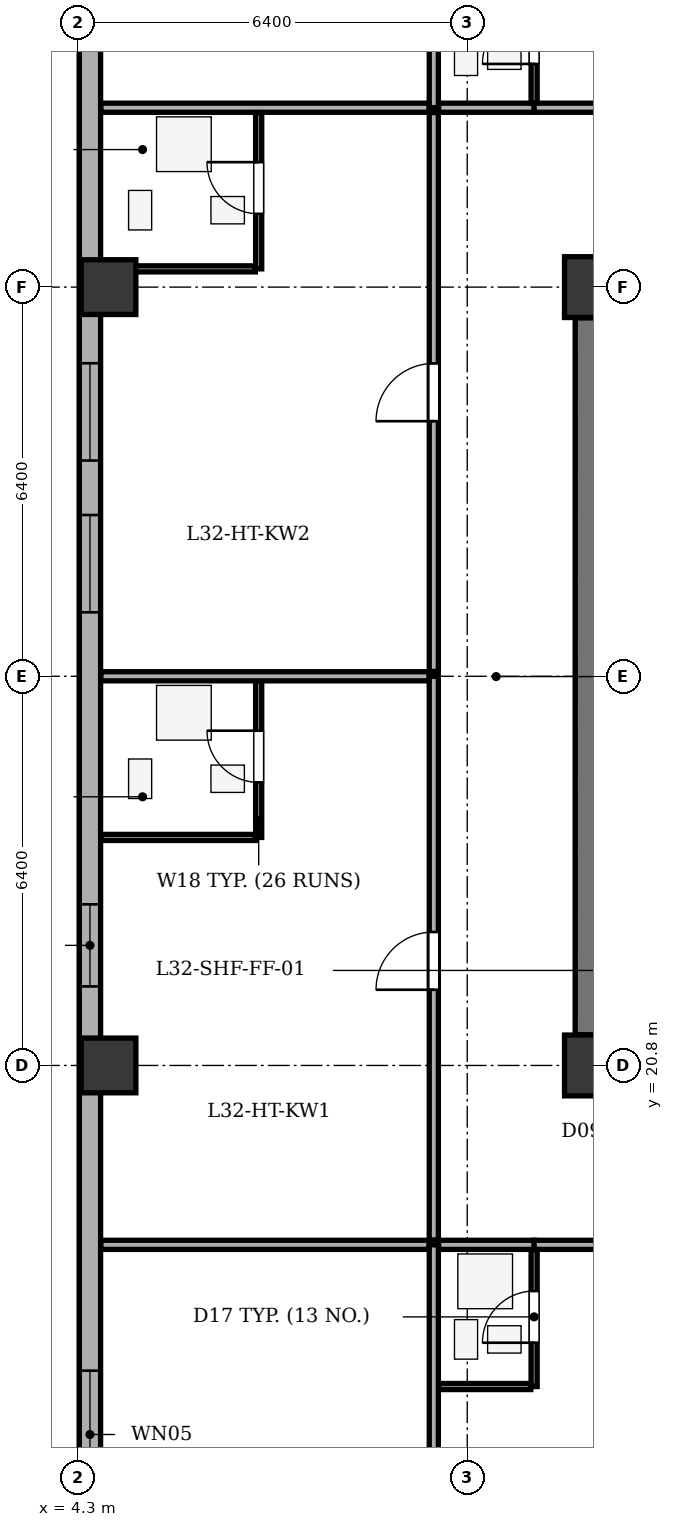
"""IFC4 building model, lengths in metres.
Left out: names, types, materials, properties, quantities, classifications, styles, units other than length and angle.
Written with IfcOpenShell. Run it as: python <this file> out.ifc"""

import sys

from ifc_helpers import new_model, si_unit, direction, frame, frame_2d, origin, origin_2d, place, context, subcontext, project, spatial, rectangle, extrude, element, fill, save


model = new_model("IFC4")
c1 = context("Model", 3, precision=1e-05, world=origin(), true_north=direction((0.0, 1.0)))
c2 = subcontext(c1, "Body", "Model", "MODEL_VIEW")
j1 = project(units=[si_unit("LENGTHUNIT", "METRE"), si_unit("PLANEANGLEUNIT", "RADIAN")], contexts=[c1])
p1 = place(None, origin())
s1 = spatial("IfcSite", under=j1, at=p1, CompositionType="ELEMENT")
p2 = place(p1, origin())
s2 = spatial("IfcBuilding", under=s1, at=p2, CompositionType="ELEMENT")
p3 = place(p2, frame((0.0, 0.0, 130.8)))
s3 = spatial("IfcBuildingStorey", under=s2, at=p3, CompositionType="ELEMENT", Elevation=130.8)
for number, where, z_axis, x_axis in (
    (1, (12.8, 20.8, 0.0), (0.0, 0.0, 1.0), (1.0, 0.0, 0.0)),
    (2, (12.8, 33.6, 0.0), (0.0, 0.0, 1.0), (1.0, 0.0, 0.0)),
):
    element("IfcColumn", number, at=place(p3, frame(where, z_axis=z_axis, x_axis=x_axis)), inside=s3, PredefinedType="COLUMN", context=c2, shape_type="SweptSolid", body=[
        extrude(rectangle(XDim=1.0, YDim=1.0, at=origin_2d()), origin(), (0.0, 0.0, 1.0), 3.5),
    ])
for number, where, z_axis, x_axis in (
    (3, (4.8, 20.8, 0.0), (0.0, 0.0, 1.0), (1.0, 0.0, 0.0)),
    (4, (4.8, 33.6, 0.0), (0.0, 0.0, 1.0), (1.0, 0.0, 0.0)),
):
    element("IfcColumn", number, at=place(p3, frame(where, z_axis=z_axis, x_axis=x_axis)), inside=s3, PredefinedType="COLUMN", context=c2, shape_type="SweptSolid", body=[
        extrude(rectangle(XDim=0.9, YDim=0.9, at=origin_2d()), origin(), (0.0, 0.0, 1.0), 3.5),
    ])
p4 = place(p3, frame((4.495, 6.5, 0.0), z_axis=(0.0, 0.0, 1.0), x_axis=(0.0, 1.0, 0.0)))
e5 = element("IfcWall", 5, at=p4, inside=s3, PredefinedType="STANDARD", context=c2, shape_type="SweptSolid", body=[
    extrude(rectangle(XDim=35.0, YDim=0.35, at=frame_2d((17.5, 0.0))), origin(), (0.0, 0.0, 1.0), 2.785),
])
p5 = place(p4, frame((2.595, 0.0, 0.75)))
e6 = element("IfcOpeningElement", 6, at=p5, cuts=e5, PredefinedType="OPENING", context=c2, shape_type="SweptSolid", body=[
    extrude(rectangle(XDim=1.6, YDim=1.75, at=frame_2d((0.8, 0.875))), frame((0.0, 0.185, 0.0), z_axis=(0.0, -1.0, 0.0), x_axis=(1.0, 0.0, 0.0)), (0.0, 0.0, 1.0), 0.37),
])
p6 = place(p4, frame((7.181, 0.0, 0.75)))
e7 = element("IfcOpeningElement", 7, at=p6, cuts=e5, PredefinedType="OPENING", context=c2, shape_type="SweptSolid", body=[
    extrude(rectangle(XDim=2.1, YDim=1.75, at=frame_2d((1.05, 0.875))), frame((0.0, 0.185, 0.0), z_axis=(0.0, -1.0, 0.0), x_axis=(1.0, 0.0, 0.0)), (0.0, 0.0, 1.0), 0.37),
])
p7 = place(p4, frame((15.6, 0.0, 0.75)))
e8 = element("IfcOpeningElement", 8, at=p7, cuts=e5, PredefinedType="OPENING", context=c2, shape_type="SweptSolid", body=[
    extrude(rectangle(XDim=1.35, YDim=1.75, at=frame_2d((0.675, 0.875))), frame((0.0, 0.185, 0.0), z_axis=(0.0, -1.0, 0.0), x_axis=(1.0, 0.0, 0.0)), (0.0, 0.0, 1.0), 0.37),
])
p8 = place(p4, frame((21.752, 0.0, 0.75)))
e9 = element("IfcOpeningElement", 9, at=p8, cuts=e5, PredefinedType="OPENING", context=c2, shape_type="SweptSolid", body=[
    extrude(rectangle(XDim=1.6, YDim=1.75, at=frame_2d((0.8, 0.875))), frame((0.0, 0.185, 0.0), z_axis=(0.0, -1.0, 0.0), x_axis=(1.0, 0.0, 0.0)), (0.0, 0.0, 1.0), 0.37),
])
p9 = place(p4, frame((24.248, 0.0, 0.75)))
e10 = element("IfcOpeningElement", 10, at=p9, cuts=e5, PredefinedType="OPENING", context=c2, shape_type="SweptSolid", body=[
    extrude(rectangle(XDim=1.6, YDim=1.75, at=frame_2d((0.8, 0.875))), frame((0.0, 0.185, 0.0), z_axis=(0.0, -1.0, 0.0), x_axis=(1.0, 0.0, 0.0)), (0.0, 0.0, 1.0), 0.37),
])
p10 = place(p4, frame((31.588, 0.0, 0.75)))
e11 = element("IfcOpeningElement", 11, at=p10, cuts=e5, PredefinedType="OPENING", context=c2, shape_type="SweptSolid", body=[
    extrude(rectangle(XDim=1.6, YDim=1.75, at=frame_2d((0.8, 0.875))), frame((0.0, 0.185, 0.0), z_axis=(0.0, -1.0, 0.0), x_axis=(1.0, 0.0, 0.0)), (0.0, 0.0, 1.0), 0.37),
])
p11 = place(p3, frame((12.8, 21.305, 0.0), z_axis=(0.0, 0.0, 1.0), x_axis=(0.0, 1.0, 0.0)))
e12 = element("IfcWall", 12, at=p11, inside=s3, PredefinedType="SHEAR", context=c2, shape_type="SweptSolid", body=[
    extrude(rectangle(XDim=11.79, YDim=0.65, at=frame_2d((5.895, 0.0))), origin(), (0.0, 0.0, 1.0), 3.2),
])
p12 = place(p3, frame((10.15, 1.875, 0.0), z_axis=(0.0, 0.0, 1.0), x_axis=(0.0, 1.0, 0.0)))
e13 = element("IfcWall", 13, at=p12, inside=s3, PredefinedType="PARTITIONING", context=c2, shape_type="SweptSolid", body=[
    extrude(rectangle(XDim=15.975, YDim=0.15, at=frame_2d((7.988, 0.0))), origin(), (0.0, 0.0, 1.0), 3.2),
])
p13 = place(p3, frame((10.23, 17.85, 0.0), z_axis=(0.0, 0.0, 1.0), x_axis=(1.0, 0.0, 0.0)))
e14 = element("IfcWall", 14, at=p13, inside=s3, PredefinedType="PARTITIONING", context=c2, shape_type="SweptSolid", body=[
    extrude(rectangle(XDim=1.57, YDim=0.15, at=frame_2d((0.785, 0.0))), origin(), (0.0, 0.0, 1.0), 3.2),
])
p14 = place(p3, frame((11.8, 17.85, 0.0), z_axis=(0.0, 0.0, 1.0), x_axis=(1.0, 0.0, 0.0)))
e15 = element("IfcWall", 15, at=p14, inside=s3, PredefinedType="PARTITIONING", context=c2, shape_type="SweptSolid", body=[
    extrude(rectangle(XDim=3.814, YDim=0.15, at=frame_2d((1.907, 0.0))), origin(), (0.0, 0.0, 1.0), 3.2),
])
p15 = place(p14, frame((1.427, 0.0, 0.0)))
e16 = element("IfcOpeningElement", 16, at=p15, cuts=e15, PredefinedType="OPENING", context=c2, shape_type="SweptSolid", body=[
    extrude(rectangle(XDim=0.95, YDim=2.1, at=frame_2d((0.475, 1.05))), frame((0.0, 0.085, 0.0), z_axis=(0.0, -1.0, 0.0), x_axis=(1.0, 0.0, 0.0)), (0.0, 0.0, 1.0), 0.17),
])
p16 = place(p3, frame((11.8, 15.52, 0.0), z_axis=(0.0, 0.0, 1.0), x_axis=(0.0, 1.0, 0.0)))
e17 = element("IfcWall", 17, at=p16, inside=s3, PredefinedType="PARTITIONING", context=c2, shape_type="SweptSolid", body=[
    extrude(rectangle(XDim=2.25, YDim=0.1, at=frame_2d((1.125, 0.0))), origin(), (0.0, 0.0, 1.0), 3.2),
])
p17 = place(p16, frame((0.72, 0.0, 0.0)))
e18 = element("IfcOpeningElement", 18, at=p17, cuts=e17, PredefinedType="OPENING", context=c2, shape_type="SweptSolid", body=[
    extrude(rectangle(XDim=0.85, YDim=2.05, at=frame_2d((0.425, 1.025))), frame((0.0, 0.06, 0.0), z_axis=(0.0, -1.0, 0.0), x_axis=(1.0, 0.0, 0.0)), (0.0, 0.0, 1.0), 0.12),
])
p18 = place(p3, frame((10.23, 15.52, 0.0), z_axis=(0.0, 0.0, 1.0), x_axis=(1.0, 0.0, 0.0)))
e19 = element("IfcWall", 19, at=p18, inside=s3, PredefinedType="PARTITIONING", context=c2, shape_type="SweptSolid", body=[
    extrude(rectangle(XDim=1.515, YDim=0.1, at=frame_2d((0.758, 0.0))), origin(), (0.0, 0.0, 1.0), 3.2),
])
p19 = place(p3, frame((10.15, 36.55, 0.0), z_axis=(0.0, 0.0, 1.0), x_axis=(0.0, 1.0, 0.0)))
e20 = element("IfcWall", 20, at=p19, inside=s3, PredefinedType="PARTITIONING", context=c2, shape_type="SweptSolid", body=[
    extrude(rectangle(XDim=9.575, YDim=0.15, at=frame_2d((4.788, 0.0))), origin(), (0.0, 0.0, 1.0), 3.2),
])
p20 = place(p3, frame((10.23, 36.55, 0.0), z_axis=(0.0, 0.0, 1.0), x_axis=(1.0, 0.0, 0.0)))
e21 = element("IfcWall", 21, at=p20, inside=s3, PredefinedType="PARTITIONING", context=c2, shape_type="SweptSolid", body=[
    extrude(rectangle(XDim=1.57, YDim=0.15, at=frame_2d((0.785, 0.0))), origin(), (0.0, 0.0, 1.0), 3.2),
])
p21 = place(p3, frame((11.8, 36.55, 0.0), z_axis=(0.0, 0.0, 1.0), x_axis=(1.0, 0.0, 0.0)))
e22 = element("IfcWall", 22, at=p21, inside=s3, PredefinedType="PARTITIONING", context=c2, shape_type="SweptSolid", body=[
    extrude(rectangle(XDim=4.156, YDim=0.15, at=frame_2d((2.078, 0.0))), origin(), (0.0, 0.0, 1.0), 3.2),
])
p22 = place(p21, frame((1.598, 0.0, 0.0)))
e23 = element("IfcOpeningElement", 23, at=p22, cuts=e22, PredefinedType="OPENING", context=c2, shape_type="SweptSolid", body=[
    extrude(rectangle(XDim=0.95, YDim=2.1, at=frame_2d((0.475, 1.05))), frame((0.0, 0.085, 0.0), z_axis=(0.0, -1.0, 0.0), x_axis=(1.0, 0.0, 0.0)), (0.0, 0.0, 1.0), 0.17),
])
p23 = place(p3, frame((11.8, 36.63, 0.0), z_axis=(0.0, 0.0, 1.0), x_axis=(0.0, 1.0, 0.0)))
e24 = element("IfcWall", 24, at=p23, inside=s3, PredefinedType="PARTITIONING", context=c2, shape_type="SweptSolid", body=[
    extrude(rectangle(XDim=2.25, YDim=0.1, at=frame_2d((1.125, 0.0))), origin(), (0.0, 0.0, 1.0), 3.2),
])
p24 = place(p23, frame((0.64, 0.0, 0.0)))
e25 = element("IfcOpeningElement", 25, at=p24, cuts=e24, PredefinedType="OPENING", context=c2, shape_type="SweptSolid", body=[
    extrude(rectangle(XDim=0.85, YDim=2.05, at=frame_2d((0.425, 1.025))), frame((0.0, 0.06, 0.0), z_axis=(0.0, -1.0, 0.0), x_axis=(1.0, 0.0, 0.0)), (0.0, 0.0, 1.0), 0.12),
])
for number, where, z_axis, x_axis in (
    (26, (4.675, 17.85, 0.0), (0.0, 0.0, 1.0), (1.0, 0.0, 0.0)),
    (27, (4.675, 36.55, 0.0), (0.0, 0.0, 1.0), (1.0, 0.0, 0.0)),
):
    element("IfcWall", number, at=place(p3, frame(where, z_axis=z_axis, x_axis=x_axis)), inside=s3, PredefinedType="PARTITIONING", context=c2, shape_type="SweptSolid", body=[
        extrude(rectangle(XDim=5.395, YDim=0.15, at=frame_2d((2.698, 0.0))), origin(), (0.0, 0.0, 1.0), 3.2),
    ])
p25 = place(p3, frame((10.15, 17.93, 0.0), z_axis=(0.0, 0.0, 1.0), x_axis=(0.0, 1.0, 0.0)))
e28 = element("IfcWall", 28, at=p25, inside=s3, PredefinedType="PARTITIONING", context=c2, shape_type="SweptSolid", body=[
    extrude(rectangle(XDim=9.27, YDim=0.15, at=frame_2d((4.635, 0.0))), origin(), (0.0, 0.0, 1.0), 3.2),
])
p26 = place(p25, frame((4.115, 0.0, 0.0)))
e29 = element("IfcOpeningElement", 29, at=p26, cuts=e28, PredefinedType="OPENING", context=c2, shape_type="SweptSolid", body=[
    extrude(rectangle(XDim=0.95, YDim=2.1, at=frame_2d((0.475, 1.05))), frame((0.0, 0.085, 0.0), z_axis=(0.0, -1.0, 0.0), x_axis=(1.0, 0.0, 0.0)), (0.0, 0.0, 1.0), 0.17),
])
p27 = place(p3, frame((7.27, 24.55, 0.0), z_axis=(0.0, 0.0, 1.0), x_axis=(0.0, 1.0, 0.0)))
e30 = element("IfcWall", 30, at=p27, inside=s3, PredefinedType="PARTITIONING", context=c2, shape_type="SweptSolid", body=[
    extrude(rectangle(XDim=2.65, YDim=0.1, at=frame_2d((1.325, 0.0))), origin(), (0.0, 0.0, 1.0), 3.2),
])
p28 = place(p27, frame((0.905, 0.0, 0.0)))
e31 = element("IfcOpeningElement", 31, at=p28, cuts=e30, PredefinedType="OPENING", context=c2, shape_type="SweptSolid", body=[
    extrude(rectangle(XDim=0.85, YDim=2.05, at=frame_2d((0.425, 1.025))), frame((0.0, 0.06, 0.0), z_axis=(0.0, -1.0, 0.0), x_axis=(1.0, 0.0, 0.0)), (0.0, 0.0, 1.0), 0.12),
])
p29 = place(p3, frame((4.675, 24.55, 0.0), z_axis=(0.0, 0.0, 1.0), x_axis=(1.0, 0.0, 0.0)))
e32 = element("IfcWall", 32, at=p29, inside=s3, PredefinedType="PARTITIONING", context=c2, shape_type="SweptSolid", body=[
    extrude(rectangle(XDim=2.54, YDim=0.1, at=frame_2d((1.27, 0.0))), origin(), (0.0, 0.0, 1.0), 3.2),
])
p30 = place(p3, frame((4.675, 27.2, 0.0), z_axis=(0.0, 0.0, 1.0), x_axis=(1.0, 0.0, 0.0)))
e33 = element("IfcWall", 33, at=p30, inside=s3, PredefinedType="PARTITIONING", context=c2, shape_type="SweptSolid", body=[
    extrude(rectangle(XDim=5.395, YDim=0.15, at=frame_2d((2.698, 0.0))), origin(), (0.0, 0.0, 1.0), 3.2),
])
p31 = place(p3, frame((10.15, 27.28, 0.0), z_axis=(0.0, 0.0, 1.0), x_axis=(0.0, 1.0, 0.0)))
e34 = element("IfcWall", 34, at=p31, inside=s3, PredefinedType="PARTITIONING", context=c2, shape_type="SweptSolid", body=[
    extrude(rectangle(XDim=9.19, YDim=0.15, at=frame_2d((4.595, 0.0))), origin(), (0.0, 0.0, 1.0), 3.2),
])
p32 = place(p31, frame((4.115, 0.0, 0.0)))
e35 = element("IfcOpeningElement", 35, at=p32, cuts=e34, PredefinedType="OPENING", context=c2, shape_type="SweptSolid", body=[
    extrude(rectangle(XDim=0.95, YDim=2.1, at=frame_2d((0.475, 1.05))), frame((0.0, 0.085, 0.0), z_axis=(0.0, -1.0, 0.0), x_axis=(1.0, 0.0, 0.0)), (0.0, 0.0, 1.0), 0.17),
])
p33 = place(p3, frame((7.27, 33.9, 0.0), z_axis=(0.0, 0.0, 1.0), x_axis=(0.0, 1.0, 0.0)))
e36 = element("IfcWall", 36, at=p33, inside=s3, PredefinedType="PARTITIONING", context=c2, shape_type="SweptSolid", body=[
    extrude(rectangle(XDim=2.57, YDim=0.1, at=frame_2d((1.285, 0.0))), origin(), (0.0, 0.0, 1.0), 3.2),
])
p34 = place(p33, frame((0.905, 0.0, 0.0)))
e37 = element("IfcOpeningElement", 37, at=p34, cuts=e36, PredefinedType="OPENING", context=c2, shape_type="SweptSolid", body=[
    extrude(rectangle(XDim=0.85, YDim=2.05, at=frame_2d((0.425, 1.025))), frame((0.0, 0.06, 0.0), z_axis=(0.0, -1.0, 0.0), x_axis=(1.0, 0.0, 0.0)), (0.0, 0.0, 1.0), 0.12),
])
p35 = place(p3, frame((4.675, 33.9, 0.0), z_axis=(0.0, 0.0, 1.0), x_axis=(1.0, 0.0, 0.0)))
e38 = element("IfcWall", 38, at=p35, inside=s3, PredefinedType="PARTITIONING", context=c2, shape_type="SweptSolid", body=[
    extrude(rectangle(XDim=2.54, YDim=0.1, at=frame_2d((1.27, 0.0))), origin(), (0.0, 0.0, 1.0), 2.535),
])
p36 = place(p6, origin())
e39 = element("IfcWindow", 39, at=p36, inside=s3, PartitioningType="SINGLE_PANEL", PredefinedType="WINDOW", context=c2, shape_type="SweptSolid", body=[
    extrude(rectangle(XDim=2.1, YDim=1.75, at=frame_2d((1.05, 0.875))), frame((0.0, -0.01, 0.0), z_axis=(0.0, -1.0, 0.0), x_axis=(1.0, 0.0, 0.0)), (0.0, 0.0, 1.0), 0.06),
])
fill(e7, e39)
p37 = place(p7, origin())
e40 = element("IfcWindow", 40, at=p37, inside=s3, PartitioningType="SINGLE_PANEL", PredefinedType="WINDOW", context=c2, shape_type="SweptSolid", body=[
    extrude(rectangle(XDim=1.35, YDim=1.75, at=frame_2d((0.675, 0.875))), frame((0.0, -0.01, 0.0), z_axis=(0.0, -1.0, 0.0), x_axis=(1.0, 0.0, 0.0)), (0.0, 0.0, 1.0), 0.06),
])
fill(e8, e40)
p38 = place(p8, origin())
e41 = element("IfcWindow", 41, at=p38, inside=s3, PartitioningType="SINGLE_PANEL", PredefinedType="WINDOW", context=c2, shape_type="SweptSolid", body=[
    extrude(rectangle(XDim=1.6, YDim=1.75, at=frame_2d((0.8, 0.875))), frame((0.0, -0.01, 0.0), z_axis=(0.0, -1.0, 0.0), x_axis=(1.0, 0.0, 0.0)), (0.0, 0.0, 1.0), 0.06),
])
fill(e9, e41)
p39 = place(p9, origin())
e42 = element("IfcWindow", 42, at=p39, inside=s3, PartitioningType="SINGLE_PANEL", PredefinedType="WINDOW", context=c2, shape_type="SweptSolid", body=[
    extrude(rectangle(XDim=1.6, YDim=1.75, at=frame_2d((0.8, 0.875))), frame((0.0, -0.01, 0.0), z_axis=(0.0, -1.0, 0.0), x_axis=(1.0, 0.0, 0.0)), (0.0, 0.0, 1.0), 0.06),
])
fill(e10, e42)
p40 = place(p17, origin())
e43 = element("IfcDoor", 43, at=p40, inside=s3, OperationType="SINGLE_SWING_LEFT", PredefinedType="DOOR", context=c2, shape_type="SweptSolid", body=[
    extrude(rectangle(XDim=0.85, YDim=2.05, at=frame_2d((0.425, 1.025))), frame((0.0, 0.025, 0.0), z_axis=(0.0, -1.0, 0.0), x_axis=(1.0, 0.0, 0.0)), (0.0, 0.0, 1.0), 0.05),
])
fill(e18, e43)
p41 = place(p24, origin())
e44 = element("IfcDoor", 44, at=p41, inside=s3, OperationType="SINGLE_SWING_LEFT", PredefinedType="DOOR", context=c2, shape_type="SweptSolid", body=[
    extrude(rectangle(XDim=0.85, YDim=2.05, at=frame_2d((0.425, 1.025))), frame((0.0, 0.025, 0.0), z_axis=(0.0, -1.0, 0.0), x_axis=(1.0, 0.0, 0.0)), (0.0, 0.0, 1.0), 0.05),
])
fill(e25, e44)
p42 = place(p28, origin())
e45 = element("IfcDoor", 45, at=p42, inside=s3, OperationType="SINGLE_SWING_RIGHT", PredefinedType="DOOR", context=c2, shape_type="SweptSolid", body=[
    extrude(rectangle(XDim=0.85, YDim=2.05, at=frame_2d((0.425, 1.025))), frame((0.0, 0.025, 0.0), z_axis=(0.0, -1.0, 0.0), x_axis=(1.0, 0.0, 0.0)), (0.0, 0.0, 1.0), 0.05),
])
fill(e31, e45)
p43 = place(p26, origin())
e46 = element("IfcDoor", 46, at=p43, inside=s3, OperationType="SINGLE_SWING_LEFT", PredefinedType="DOOR", context=c2, shape_type="SweptSolid", body=[
    extrude(rectangle(XDim=0.95, YDim=2.1, at=frame_2d((0.475, 1.05))), frame((0.0, 0.025, 0.0), z_axis=(0.0, -1.0, 0.0), x_axis=(1.0, 0.0, 0.0)), (0.0, 0.0, 1.0), 0.05),
])
fill(e29, e46)
p44 = place(p34, origin())
e47 = element("IfcDoor", 47, at=p44, inside=s3, OperationType="SINGLE_SWING_RIGHT", PredefinedType="DOOR", context=c2, shape_type="SweptSolid", body=[
    extrude(rectangle(XDim=0.85, YDim=2.05, at=frame_2d((0.425, 1.025))), frame((0.0, 0.025, 0.0), z_axis=(0.0, -1.0, 0.0), x_axis=(1.0, 0.0, 0.0)), (0.0, 0.0, 1.0), 0.05),
])
fill(e37, e47)
p45 = place(p32, origin())
e48 = element("IfcDoor", 48, at=p45, inside=s3, OperationType="SINGLE_SWING_LEFT", PredefinedType="DOOR", context=c2, shape_type="SweptSolid", body=[
    extrude(rectangle(XDim=0.95, YDim=2.1, at=frame_2d((0.475, 1.05))), frame((0.0, 0.025, 0.0), z_axis=(0.0, -1.0, 0.0), x_axis=(1.0, 0.0, 0.0)), (0.0, 0.0, 1.0), 0.05),
])
fill(e35, e48)
save(model, sys.argv[1])
